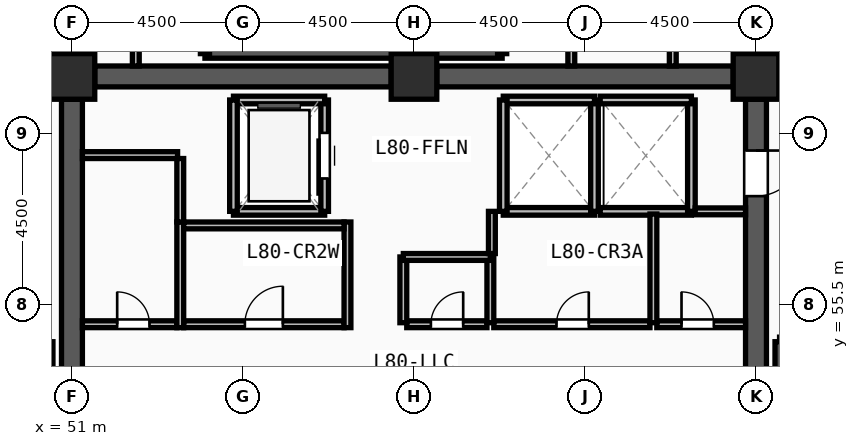
"""IFC4 building model, lengths in metres.
Left out: names, types, materials, properties, quantities, classifications, styles, units other than length and angle.
Written with IfcOpenShell. Run it as: python <this file> out.ifc"""

import sys

from ifc_helpers import new_model, si_unit, direction, frame, frame_2d, origin, origin_2d, place, context, subcontext, project, spatial, rectangle, extrude, source, transform, mapped, element, fill, save


model = new_model("IFC4")
c1 = context("Model", 3, precision=1e-05, world=origin(), true_north=direction((0.0, 1.0)))
c2 = subcontext(c1, "Body", "Model", "MODEL_VIEW")
j1 = project(units=[si_unit("LENGTHUNIT", "METRE"), si_unit("PLANEANGLEUNIT", "RADIAN")], contexts=[c1])
p1 = place(None, origin())
s1 = spatial("IfcSite", under=j1, at=p1, CompositionType="ELEMENT")
p2 = place(p1, origin())
s2 = spatial("IfcBuilding", under=s1, at=p2, CompositionType="ELEMENT")
p3 = place(p2, frame((0.0, 0.0, 309.0)))
s3 = spatial("IfcBuildingStorey", under=s2, at=p3, CompositionType="ELEMENT", Elevation=309.0)
m1 = source(origin(), c2, "Body", "SweptSolid", [
    extrude(rectangle(XDim=1.2, YDim=1.2, at=origin_2d()), origin(), (0.0, 0.0, 1.0), 3.75),
])
for number, where, z_axis, x_axis in (
    (1, (69.0, 61.5, 0.0), (0.0, 0.0, 1.0), (1.0, 0.0, 0.0)),
    (2, (60.0, 61.5, 0.0), (0.0, 0.0, 1.0), (1.0, 0.0, 0.0)),
    (3, (51.0, 61.5, 0.0), (0.0, 0.0, 1.0), (1.0, 0.0, 0.0)),
):
    element("IfcColumn", number, at=place(p3, frame(where, z_axis=z_axis, x_axis=x_axis)), inside=s3, PredefinedType="COLUMN", context=c2, shape_type="MappedRepresentation", body=[
        mapped(m1, transform((0.0, 0.0, 0.0), x_axis=(1.0, 0.0, 0.0), y_axis=(0.0, 1.0, 0.0), z_axis=(0.0, 0.0, 1.0), scale=1.0)),
    ])
for number, where, z_axis, x_axis in (
    (4, (51.6, 61.5, 0.0), (0.0, 0.0, 1.0), (1.0, 0.0, 0.0)),
    (5, (60.6, 61.5, 0.0), (0.0, 0.0, 1.0), (1.0, 0.0, 0.0)),
):
    element("IfcWall", number, at=place(p3, frame(where, z_axis=z_axis, x_axis=x_axis)), inside=s3, PredefinedType="SHEAR", context=c2, shape_type="SweptSolid", body=[
        extrude(rectangle(XDim=7.8, YDim=0.55, at=frame_2d((3.9, 0.0))), origin(), (0.0, 0.0, 1.0), 3.57),
    ])
p4 = place(p3, frame((69.0, 60.9, 0.0), z_axis=(0.0, 0.0, 1.0), x_axis=(0.0, -1.0, 0.0)))
e6 = element("IfcWall", 6, at=p4, inside=s3, PredefinedType="SHEAR", context=c2, shape_type="SweptSolid", body=[
    extrude(rectangle(XDim=13.8, YDim=0.55, at=frame_2d((6.9, 0.0))), origin(), (0.0, 0.0, 1.0), 3.57),
])
m2 = source(origin(), c2, "Body", "SweptSolid", [
    extrude(rectangle(XDim=1.2, YDim=2.2, at=frame_2d((0.6, 1.1))), frame((0.0, 0.285, 0.0), z_axis=(0.0, -1.0, 0.0), x_axis=(1.0, 0.0, 0.0)), (0.0, 0.0, 1.0), 0.57),
])
p5 = place(p4, frame((1.35, 0.0, 0.0)))
e7 = element("IfcOpeningElement", 7, at=p5, cuts=e6, PredefinedType="OPENING", context=c2, shape_type="MappedRepresentation", body=[
    mapped(m2, transform((0.0, 0.0, 0.0), x_axis=(1.0, 0.0, 0.0), y_axis=(0.0, 1.0, 0.0), z_axis=(0.0, 0.0, 1.0), scale=1.0)),
])
p6 = place(p3, frame((51.0, 47.1, 0.0), z_axis=(0.0, 0.0, 1.0), x_axis=(0.0, 1.0, 0.0)))
e8 = element("IfcWall", 8, at=p6, inside=s3, PredefinedType="SHEAR", context=c2, shape_type="SweptSolid", body=[
    extrude(rectangle(XDim=13.8, YDim=0.55, at=frame_2d((6.9, 0.0))), origin(), (0.0, 0.0, 1.0), 3.57),
])
for number, where, z_axis, x_axis in (
    (9, (50.38, 46.7, 0.0), (0.0, 0.0, 1.0), (0.0, 1.0, 0.0)),
    (10, (69.62, 54.52, 0.0), (0.0, 0.0, 1.0), (0.0, -1.0, 0.0)),
    (11, (54.5, 62.1, 0.0), (0.0, 0.0, 1.0), (1.0, 0.0, 0.0)),
):
    element("IfcWall", number, at=place(p3, frame(where, z_axis=z_axis, x_axis=x_axis)), inside=s3, PredefinedType="SOLIDWALL", context=c2, shape_type="SweptSolid", body=[
        extrude(rectangle(XDim=7.82, YDim=0.24, at=frame_2d((3.91, 0.0))), origin(), (0.0, 0.0, 1.0), 3.57),
    ])
for number, where, z_axis, x_axis in (
    (12, (62.32, 62.1, 0.0), (0.0, 0.0, 1.0), (0.0, 1.0, 0.0)),
    (13, (54.5, 65.54, 0.0), (0.0, 0.0, 1.0), (0.0, -1.0, 0.0)),
):
    element("IfcWall", number, at=place(p3, frame(where, z_axis=z_axis, x_axis=x_axis)), inside=s3, PredefinedType="SOLIDWALL", context=c2, shape_type="SweptSolid", body=[
        extrude(rectangle(XDim=3.44, YDim=0.24, at=frame_2d((1.72, 0.0))), origin(), (0.0, 0.0, 1.0), 3.57),
    ])
p7 = place(p3, frame((55.25, 57.95, 0.0), z_axis=(0.0, 0.0, 1.0), x_axis=(1.0, 0.0, 0.0)))
e14 = element("IfcWall", 14, at=p7, inside=s3, PredefinedType="SOLIDWALL", context=c2, shape_type="SweptSolid", body=[
    extrude(rectangle(XDim=2.4, YDim=0.2, at=frame_2d((1.2, 0.0))), origin(), (0.0, 0.0, 1.0), 3.57),
])
p8 = place(p3, frame((57.65, 57.95, 0.0), z_axis=(0.0, 0.0, 1.0), x_axis=(0.0, 1.0, 0.0)))
e15 = element("IfcWall", 15, at=p8, inside=s3, PredefinedType="SOLIDWALL", context=c2, shape_type="SweptSolid", body=[
    extrude(rectangle(XDim=2.93, YDim=0.2, at=frame_2d((1.465, 0.0))), origin(), (0.0, 0.0, 1.0), 3.57),
])
m3 = source(origin(), c2, "Body", "SweptSolid", [
    extrude(rectangle(XDim=1.2, YDim=2.3, at=frame_2d((0.6, 1.15))), frame((0.0, 0.11, 0.0), z_axis=(0.0, -1.0, 0.0), x_axis=(1.0, 0.0, 0.0)), (0.0, 0.0, 1.0), 0.22),
])
p9 = place(p8, frame((0.865, 0.0, 0.0)))
e16 = element("IfcOpeningElement", 16, at=p9, cuts=e15, PredefinedType="OPENING", context=c2, shape_type="MappedRepresentation", body=[
    mapped(m3, transform((0.0, 0.0, 0.0), x_axis=(1.0, 0.0, 0.0), y_axis=(0.0, 1.0, 0.0), z_axis=(0.0, 0.0, 1.0), scale=1.0)),
])
p10 = place(p3, frame((57.65, 60.88, 0.0), z_axis=(0.0, 0.0, 1.0), x_axis=(-1.0, 0.0, 0.0)))
e17 = element("IfcWall", 17, at=p10, inside=s3, PredefinedType="SOLIDWALL", context=c2, shape_type="SweptSolid", body=[
    extrude(rectangle(XDim=2.4, YDim=0.2, at=frame_2d((1.2, 0.0))), origin(), (0.0, 0.0, 1.0), 3.57),
])
p11 = place(p3, frame((55.25, 60.88, 0.0), z_axis=(0.0, 0.0, 1.0), x_axis=(0.0, -1.0, 0.0)))
e18 = element("IfcWall", 18, at=p11, inside=s3, PredefinedType="SOLIDWALL", context=c2, shape_type="SweptSolid", body=[
    extrude(rectangle(XDim=2.93, YDim=0.2, at=frame_2d((1.465, 0.0))), origin(), (0.0, 0.0, 1.0), 3.57),
])
p12 = place(p3, frame((62.35, 57.95, 0.0), z_axis=(0.0, 0.0, 1.0), x_axis=(1.0, 0.0, 0.0)))
e19 = element("IfcWall", 19, at=p12, inside=s3, PredefinedType="SOLIDWALL", context=c2, shape_type="SweptSolid", body=[
    extrude(rectangle(XDim=2.4, YDim=0.2, at=frame_2d((1.2, 0.0))), origin(), (0.0, 0.0, 1.0), 3.57),
])
p13 = place(p3, frame((64.75, 57.95, 0.0), z_axis=(0.0, 0.0, 1.0), x_axis=(0.0, 1.0, 0.0)))
e20 = element("IfcWall", 20, at=p13, inside=s3, PredefinedType="SOLIDWALL", context=c2, shape_type="SweptSolid", body=[
    extrude(rectangle(XDim=2.93, YDim=0.2, at=frame_2d((1.465, 0.0))), origin(), (0.0, 0.0, 1.0), 3.57),
])
p14 = place(p3, frame((64.75, 60.88, 0.0), z_axis=(0.0, 0.0, 1.0), x_axis=(-1.0, 0.0, 0.0)))
e21 = element("IfcWall", 21, at=p14, inside=s3, PredefinedType="SOLIDWALL", context=c2, shape_type="SweptSolid", body=[
    extrude(rectangle(XDim=2.4, YDim=0.2, at=frame_2d((1.2, 0.0))), origin(), (0.0, 0.0, 1.0), 3.57),
])
p15 = place(p3, frame((62.35, 60.88, 0.0), z_axis=(0.0, 0.0, 1.0), x_axis=(0.0, -1.0, 0.0)))
e22 = element("IfcWall", 22, at=p15, inside=s3, PredefinedType="SOLIDWALL", context=c2, shape_type="SweptSolid", body=[
    extrude(rectangle(XDim=2.93, YDim=0.2, at=frame_2d((1.465, 0.0))), origin(), (0.0, 0.0, 1.0), 3.57),
])
p16 = place(p3, frame((64.9, 57.95, 0.0), z_axis=(0.0, 0.0, 1.0), x_axis=(1.0, 0.0, 0.0)))
e23 = element("IfcWall", 23, at=p16, inside=s3, PredefinedType="SOLIDWALL", context=c2, shape_type="SweptSolid", body=[
    extrude(rectangle(XDim=2.4, YDim=0.2, at=frame_2d((1.2, 0.0))), origin(), (0.0, 0.0, 1.0), 3.57),
])
p17 = place(p3, frame((67.3, 57.95, 0.0), z_axis=(0.0, 0.0, 1.0), x_axis=(0.0, 1.0, 0.0)))
e24 = element("IfcWall", 24, at=p17, inside=s3, PredefinedType="SOLIDWALL", context=c2, shape_type="SweptSolid", body=[
    extrude(rectangle(XDim=2.93, YDim=0.2, at=frame_2d((1.465, 0.0))), origin(), (0.0, 0.0, 1.0), 3.57),
])
p18 = place(p3, frame((67.3, 60.88, 0.0), z_axis=(0.0, 0.0, 1.0), x_axis=(-1.0, 0.0, 0.0)))
e25 = element("IfcWall", 25, at=p18, inside=s3, PredefinedType="SOLIDWALL", context=c2, shape_type="SweptSolid", body=[
    extrude(rectangle(XDim=2.4, YDim=0.2, at=frame_2d((1.2, 0.0))), origin(), (0.0, 0.0, 1.0), 3.57),
])
p19 = place(p3, frame((53.94, 54.98, 0.0), z_axis=(0.0, 0.0, 1.0), x_axis=(1.0, 0.0, 0.0)))
e26 = element("IfcWall", 26, at=p19, inside=s3, PredefinedType="PARTITIONING", context=c2, shape_type="SweptSolid", body=[
    extrude(rectangle(XDim=4.22, YDim=0.18, at=frame_2d((2.11, 0.0))), origin(), (0.0, 0.0, 1.0), 3.57),
])
m4 = source(origin(), c2, "Body", "SweptSolid", [
    extrude(rectangle(XDim=1.0, YDim=2.2, at=frame_2d((0.5, 1.1))), frame((0.0, 0.1, 0.0), z_axis=(0.0, -1.0, 0.0), x_axis=(1.0, 0.0, 0.0)), (0.0, 0.0, 1.0), 0.2),
])
p20 = place(p19, frame((1.61, 0.0, 0.0)))
e27 = element("IfcOpeningElement", 27, at=p20, cuts=e26, PredefinedType="OPENING", context=c2, shape_type="MappedRepresentation", body=[
    mapped(m4, transform((0.0, 0.0, 0.0), x_axis=(1.0, 0.0, 0.0), y_axis=(0.0, 1.0, 0.0), z_axis=(0.0, 0.0, 1.0), scale=1.0)),
])
p21 = place(p3, frame((51.275, 54.98, 0.0), z_axis=(0.0, 0.0, 1.0), x_axis=(1.0, 0.0, 0.0)))
e28 = element("IfcWall", 28, at=p21, inside=s3, PredefinedType="PARTITIONING", context=c2, shape_type="SweptSolid", body=[
    extrude(rectangle(XDim=2.485, YDim=0.18, at=frame_2d((1.243, 0.0))), origin(), (0.0, 0.0, 1.0), 3.57),
])
m5 = source(origin(), c2, "Body", "SweptSolid", [
    extrude(rectangle(XDim=0.85, YDim=2.1, at=frame_2d((0.425, 1.05))), frame((0.0, 0.1, 0.0), z_axis=(0.0, -1.0, 0.0), x_axis=(1.0, 0.0, 0.0)), (0.0, 0.0, 1.0), 0.2),
])
p22 = place(p21, frame((0.915, 0.0, 0.0)))
e29 = element("IfcOpeningElement", 29, at=p22, cuts=e28, PredefinedType="OPENING", context=c2, shape_type="MappedRepresentation", body=[
    mapped(m5, transform((0.0, 0.0, 0.0), x_axis=(1.0, 0.0, 0.0), y_axis=(0.0, 1.0, 0.0), z_axis=(0.0, 0.0, 1.0), scale=1.0)),
])
p23 = place(p3, frame((62.1, 54.98, 0.0), z_axis=(0.0, 0.0, 1.0), x_axis=(1.0, 0.0, 0.0)))
e30 = element("IfcWall", 30, at=p23, inside=s3, PredefinedType="PARTITIONING", context=c2, shape_type="SweptSolid", body=[
    extrude(rectangle(XDim=4.11, YDim=0.18, at=frame_2d((2.055, 0.0))), origin(), (0.0, 0.0, 1.0), 3.57),
])
p24 = place(p23, frame((1.65, 0.0, 0.0)))
e31 = element("IfcOpeningElement", 31, at=p24, cuts=e30, PredefinedType="OPENING", context=c2, shape_type="MappedRepresentation", body=[
    mapped(m5, transform((0.0, 0.0, 0.0), x_axis=(1.0, 0.0, 0.0), y_axis=(0.0, 1.0, 0.0), z_axis=(0.0, 0.0, 1.0), scale=1.0)),
])
p25 = place(p3, frame((66.39, 54.98, 0.0), z_axis=(0.0, 0.0, 1.0), x_axis=(1.0, 0.0, 0.0)))
e32 = element("IfcWall", 32, at=p25, inside=s3, PredefinedType="PARTITIONING", context=c2, shape_type="SweptSolid", body=[
    extrude(rectangle(XDim=2.335, YDim=0.18, at=frame_2d((1.167, 0.0))), origin(), (0.0, 0.0, 1.0), 3.57),
])
p26 = place(p25, frame((0.65, 0.0, 0.0)))
e33 = element("IfcOpeningElement", 33, at=p26, cuts=e32, PredefinedType="OPENING", context=c2, shape_type="MappedRepresentation", body=[
    mapped(m5, transform((0.0, 0.0, 0.0), x_axis=(1.0, 0.0, 0.0), y_axis=(0.0, 1.0, 0.0), z_axis=(0.0, 0.0, 1.0), scale=1.0)),
])
p27 = place(p3, frame((59.81, 54.98, 0.0), z_axis=(0.0, 0.0, 1.0), x_axis=(1.0, 0.0, 0.0)))
e34 = element("IfcWall", 34, at=p27, inside=s3, PredefinedType="PARTITIONING", context=c2, shape_type="SweptSolid", body=[
    extrude(rectangle(XDim=2.11, YDim=0.18, at=frame_2d((1.055, 0.0))), origin(), (0.0, 0.0, 1.0), 3.57),
])
p28 = place(p27, frame((0.635, 0.0, 0.0)))
e35 = element("IfcOpeningElement", 35, at=p28, cuts=e34, PredefinedType="OPENING", context=c2, shape_type="MappedRepresentation", body=[
    mapped(m5, transform((0.0, 0.0, 0.0), x_axis=(1.0, 0.0, 0.0), y_axis=(0.0, 1.0, 0.0), z_axis=(0.0, 0.0, 1.0), scale=1.0)),
])
p29 = place(p3, frame((51.275, 59.43, 0.0), z_axis=(0.0, 0.0, 1.0), x_axis=(1.0, 0.0, 0.0)))
e36 = element("IfcWall", 36, at=p29, inside=s3, PredefinedType="PARTITIONING", context=c2, shape_type="SweptSolid", body=[
    extrude(rectangle(XDim=2.505, YDim=0.18, at=frame_2d((1.252, 0.0))), origin(), (0.0, 0.0, 1.0), 3.57),
])
p30 = place(p3, frame((66.3, 55.02, 0.0), z_axis=(0.0, 0.0, 1.0), x_axis=(0.0, 1.0, 0.0)))
e37 = element("IfcWall", 37, at=p30, inside=s3, PredefinedType="PARTITIONING", context=c2, shape_type="SweptSolid", body=[
    extrude(rectangle(XDim=2.86, YDim=0.18, at=frame_2d((1.43, 0.0))), origin(), (0.0, 0.0, 1.0), 3.57),
])
for number, where, z_axis, x_axis in (
    (38, (59.72, 55.02, 0.0), (0.0, 0.0, 1.0), (0.0, 1.0, 0.0)),
    (39, (62.01, 55.02, 0.0), (0.0, 0.0, 1.0), (0.0, 1.0, 0.0)),
):
    element("IfcWall", number, at=place(p3, frame(where, z_axis=z_axis, x_axis=x_axis)), inside=s3, PredefinedType="PARTITIONING", context=c2, shape_type="SweptSolid", body=[
        extrude(rectangle(XDim=1.73, YDim=0.18, at=frame_2d((0.865, 0.0))), origin(), (0.0, 0.0, 1.0), 3.57),
    ])
p31 = place(p3, frame((59.72, 56.75, 0.0), z_axis=(0.0, 0.0, 1.0), x_axis=(1.0, 0.0, 0.0)))
e40 = element("IfcWall", 40, at=p31, inside=s3, PredefinedType="PARTITIONING", context=c2, shape_type="SweptSolid", body=[
    extrude(rectangle(XDim=2.29, YDim=0.18, at=frame_2d((1.145, 0.0))), origin(), (0.0, 0.0, 1.0), 3.57),
])
p32 = place(p3, frame((50.54, 61.95, 0.0), z_axis=(0.0, 0.0, 1.0), x_axis=(0.0, 1.0, 0.0)))
e41 = element("IfcWall", 41, at=p32, inside=s3, PredefinedType="PARTITIONING", context=c2, shape_type="SweptSolid", body=[
    extrude(rectangle(XDim=3.63, YDim=0.18, at=frame_2d((1.815, 0.0))), origin(), (0.0, 0.0, 1.0), 3.57),
])
for number, where, z_axis, x_axis in (
    (42, (52.68, 61.775, 0.0), (0.0, 0.0, 1.0), (0.0, 1.0, 0.0)),
    (43, (64.14, 61.775, 0.0), (0.0, 0.0, 1.0), (0.0, 1.0, 0.0)),
    (44, (66.81, 61.775, 0.0), (0.0, 0.0, 1.0), (0.0, 1.0, 0.0)),
):
    element("IfcWall", number, at=place(p3, frame(where, z_axis=z_axis, x_axis=x_axis)), inside=s3, PredefinedType="PARTITIONING", context=c2, shape_type="SweptSolid", body=[
        extrude(rectangle(XDim=3.805, YDim=0.18, at=frame_2d((1.903, 0.0))), origin(), (0.0, 0.0, 1.0), 3.57),
    ])
for number, where, z_axis, x_axis in (
    (45, (53.85, 54.89, 0.0), (0.0, 0.0, 1.0), (0.0, 1.0, 0.0)),
    (46, (58.25, 54.89, 0.0), (0.0, 0.0, 1.0), (0.0, 1.0, 0.0)),
):
    element("IfcWall", number, at=place(p3, frame(where, z_axis=z_axis, x_axis=x_axis)), inside=s3, PredefinedType="PARTITIONING", context=c2, shape_type="SweptSolid", body=[
        extrude(rectangle(XDim=2.78, YDim=0.18, at=frame_2d((1.39, 0.0))), origin(), (0.0, 0.0, 1.0), 3.57),
    ])
p33 = place(p3, frame((53.94, 57.58, 0.0), z_axis=(0.0, 0.0, 1.0), x_axis=(1.0, 0.0, 0.0)))
e47 = element("IfcWall", 47, at=p33, inside=s3, PredefinedType="PARTITIONING", context=c2, shape_type="SweptSolid", body=[
    extrude(rectangle(XDim=4.22, YDim=0.18, at=frame_2d((2.11, 0.0))), origin(), (0.0, 0.0, 1.0), 3.57),
])
p34 = place(p3, frame((53.85, 57.67, 0.0), z_axis=(0.0, 0.0, 1.0), x_axis=(0.0, 1.0, 0.0)))
e48 = element("IfcWall", 48, at=p34, inside=s3, PredefinedType="PARTITIONING", context=c2, shape_type="SweptSolid", body=[
    extrude(rectangle(XDim=1.67, YDim=0.18, at=frame_2d((0.835, 0.0))), origin(), (0.0, 0.0, 1.0), 3.57),
])
p35 = place(p3, frame((62.05, 56.84, 0.0), z_axis=(0.0, 0.0, 1.0), x_axis=(0.0, 1.0, 0.0)))
e49 = element("IfcWall", 49, at=p35, inside=s3, PredefinedType="PARTITIONING", context=c2, shape_type="SweptSolid", body=[
    extrude(rectangle(XDim=1.11, YDim=0.18, at=frame_2d((0.555, 0.0))), origin(), (0.0, 0.0, 1.0), 3.57),
])
p36 = place(p3, frame((67.4, 57.95, 0.0), z_axis=(0.0, 0.0, 1.0), x_axis=(1.0, 0.0, 0.0)))
e50 = element("IfcWall", 50, at=p36, inside=s3, PredefinedType="PARTITIONING", context=c2, shape_type="SweptSolid", body=[
    extrude(rectangle(XDim=1.325, YDim=0.18, at=frame_2d((0.663, 0.0))), origin(), (0.0, 0.0, 1.0), 3.57),
])
m6 = source(origin(), c2, "Body", "SweptSolid", [
    extrude(rectangle(XDim=1.2, YDim=2.2, at=frame_2d((0.6, 1.1))), frame((0.0, 0.025, 0.0), z_axis=(0.0, -1.0, 0.0), x_axis=(1.0, 0.0, 0.0)), (0.0, 0.0, 1.0), 0.05),
])
p37 = place(p5, origin())
e51 = element("IfcDoor", 51, at=p37, inside=s3, OperationType="SINGLE_SWING_LEFT", PredefinedType="DOOR", context=c2, shape_type="MappedRepresentation", body=[
    mapped(m6, transform((0.0, 0.0, 0.0), x_axis=(1.0, 0.0, 0.0), y_axis=(0.0, 1.0, 0.0), z_axis=(0.0, 0.0, 1.0), scale=1.0)),
])
fill(e7, e51)
m7 = source(origin(), c2, "Body", "SweptSolid", [
    extrude(rectangle(XDim=1.2, YDim=2.3, at=frame_2d((0.6, 1.15))), frame((0.0, 0.025, 0.0), z_axis=(0.0, -1.0, 0.0), x_axis=(1.0, 0.0, 0.0)), (0.0, 0.0, 1.0), 0.05),
])
p38 = place(p9, origin())
e52 = element("IfcDoor", 52, at=p38, inside=s3, OperationType="SLIDING_TO_LEFT", PredefinedType="DOOR", context=c2, shape_type="MappedRepresentation", body=[
    mapped(m7, transform((0.0, 0.0, 0.0), x_axis=(1.0, 0.0, 0.0), y_axis=(0.0, 1.0, 0.0), z_axis=(0.0, 0.0, 1.0), scale=1.0)),
])
fill(e16, e52)
m8 = source(origin(), c2, "Body", "SweptSolid", [
    extrude(rectangle(XDim=1.0, YDim=2.2, at=frame_2d((0.5, 1.1))), frame((0.0, 0.025, 0.0), z_axis=(0.0, -1.0, 0.0), x_axis=(1.0, 0.0, 0.0)), (0.0, 0.0, 1.0), 0.05),
])
p39 = place(p20, origin())
e53 = element("IfcDoor", 53, at=p39, inside=s3, OperationType="SINGLE_SWING_RIGHT", PredefinedType="DOOR", context=c2, shape_type="MappedRepresentation", body=[
    mapped(m8, transform((0.0, 0.0, 0.0), x_axis=(1.0, 0.0, 0.0), y_axis=(0.0, 1.0, 0.0), z_axis=(0.0, 0.0, 1.0), scale=1.0)),
])
fill(e27, e53)
m9 = source(origin(), c2, "Body", "SweptSolid", [
    extrude(rectangle(XDim=0.85, YDim=2.1, at=frame_2d((0.425, 1.05))), frame((0.0, 0.025, 0.0), z_axis=(0.0, -1.0, 0.0), x_axis=(1.0, 0.0, 0.0)), (0.0, 0.0, 1.0), 0.05),
])
p40 = place(p22, origin())
e54 = element("IfcDoor", 54, at=p40, inside=s3, OperationType="SINGLE_SWING_LEFT", PredefinedType="DOOR", context=c2, shape_type="MappedRepresentation", body=[
    mapped(m9, transform((0.0, 0.0, 0.0), x_axis=(1.0, 0.0, 0.0), y_axis=(0.0, 1.0, 0.0), z_axis=(0.0, 0.0, 1.0), scale=1.0)),
])
fill(e29, e54)
p41 = place(p24, origin())
e55 = element("IfcDoor", 55, at=p41, inside=s3, OperationType="SINGLE_SWING_RIGHT", PredefinedType="DOOR", context=c2, shape_type="MappedRepresentation", body=[
    mapped(m9, transform((0.0, 0.0, 0.0), x_axis=(1.0, 0.0, 0.0), y_axis=(0.0, 1.0, 0.0), z_axis=(0.0, 0.0, 1.0), scale=1.0)),
])
fill(e31, e55)
p42 = place(p26, origin())
e56 = element("IfcDoor", 56, at=p42, inside=s3, OperationType="SINGLE_SWING_LEFT", PredefinedType="DOOR", context=c2, shape_type="MappedRepresentation", body=[
    mapped(m9, transform((0.0, 0.0, 0.0), x_axis=(1.0, 0.0, 0.0), y_axis=(0.0, 1.0, 0.0), z_axis=(0.0, 0.0, 1.0), scale=1.0)),
])
fill(e33, e56)
p43 = place(p28, origin())
e57 = element("IfcDoor", 57, at=p43, inside=s3, OperationType="SINGLE_SWING_RIGHT", PredefinedType="DOOR", context=c2, shape_type="MappedRepresentation", body=[
    mapped(m9, transform((0.0, 0.0, 0.0), x_axis=(1.0, 0.0, 0.0), y_axis=(0.0, 1.0, 0.0), z_axis=(0.0, 0.0, 1.0), scale=1.0)),
])
fill(e35, e57)
save(model, sys.argv[1])
